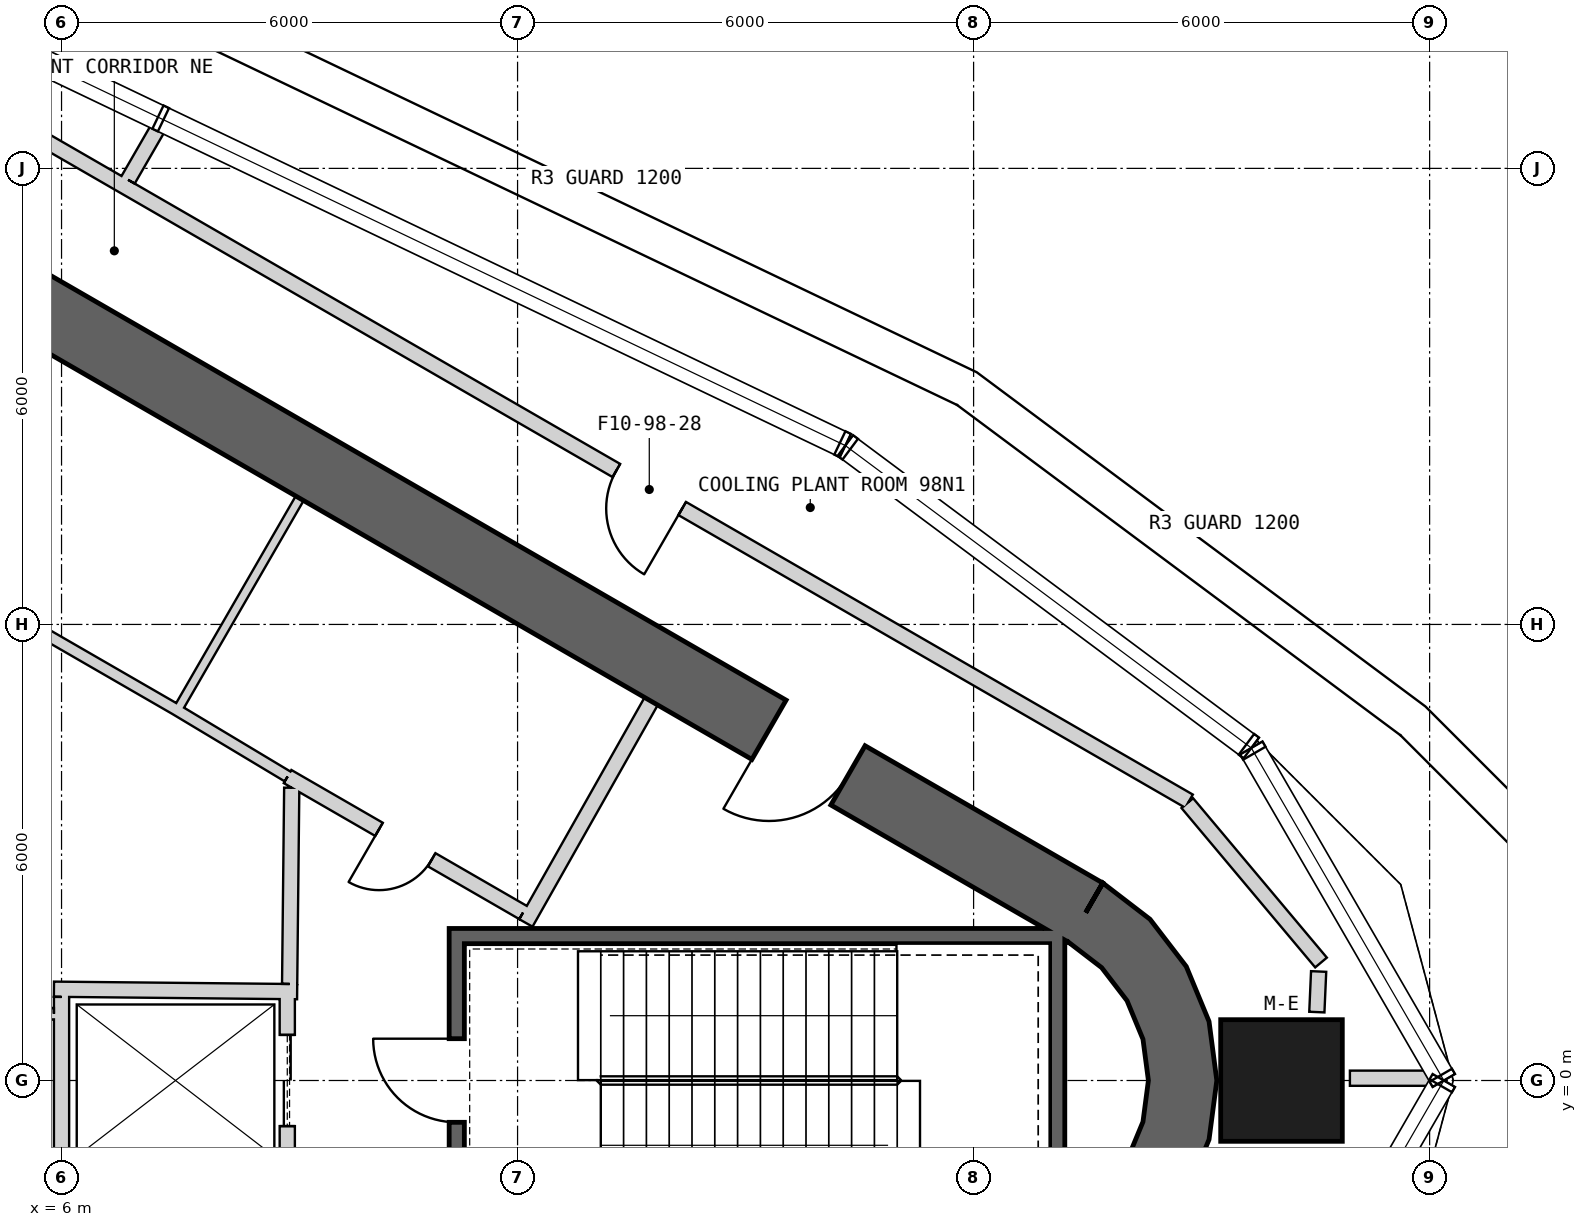
"""IFC4 building model, lengths in metres.
Left out: names, types, materials, properties, quantities, classifications, styles, units other than length and angle.
Written with IfcOpenShell. Run it as: python <this file> out.ifc"""

import sys

from ifc_helpers import new_model, si_unit, direction, frame, frame_2d, origin, origin_2d, place, context, subcontext, project, spatial, polyline, rectangle, outline, extrude, element, fill, save


model = new_model("IFC4")
c1 = context("Model", 3, precision=1e-05, world=origin(), true_north=direction((0.0, 1.0)))
c2 = subcontext(c1, "Body", "Model", "MODEL_VIEW")
j1 = project(units=[si_unit("LENGTHUNIT", "METRE"), si_unit("PLANEANGLEUNIT", "RADIAN")], contexts=[c1])
p1 = place(None, origin())
s1 = spatial("IfcSite", under=j1, at=p1, CompositionType="ELEMENT")
p2 = place(p1, origin())
s2 = spatial("IfcBuilding", under=s1, at=p2, CompositionType="ELEMENT")
p3 = place(p2, frame((0.0, 0.0, 435.3)))
s3 = spatial("IfcBuildingStorey", under=s2, at=p3, CompositionType="ELEMENT", Elevation=435.3)
p4 = place(p3, frame((22.051, 0.0, 0.0), z_axis=(0.0, 0.0, 1.0), x_axis=(1.0, 0.0, 0.0)))
e1 = element("IfcColumn", 1, at=p4, inside=s3, PredefinedType="COLUMN", context=c2, shape_type="SweptSolid", body=[
    extrude(rectangle(XDim=1.6, YDim=1.6, at=origin_2d()), origin(), (0.0, 0.0, 1.0), 5.0),
])
p5 = place(p3, frame((19.475, 2.208, 0.0), z_axis=(0.0, 0.0, 1.0), x_axis=(-0.866028369851, 0.499994862586, 0.0)))
e2 = element("IfcWall", 2, at=p5, inside=s3, PredefinedType="SHEAR", context=c2, shape_type="SweptSolid", body=[
    extrude(rectangle(XDim=31.523, YDim=0.9, at=frame_2d((15.762, 0.0))), origin(), (0.0, 0.0, 1.0), 5.0),
])
p6 = place(p5, frame((3.612, 0.0, 0.0)))
e3 = element("IfcOpeningElement", 3, at=p6, cuts=e2, PredefinedType="OPENING", context=c2, shape_type="SweptSolid", body=[
    extrude(rectangle(XDim=1.2, YDim=2.4, at=frame_2d((0.6, 1.2))), frame((0.0, 0.46, 0.0), z_axis=(0.0, -1.0, 0.0), x_axis=(1.0, 0.0, 0.0)), (0.0, 0.0, 1.0), 0.92),
])
p7 = place(p5, frame((26.712, 0.0, 0.0)))
e4 = element("IfcOpeningElement", 4, at=p7, cuts=e2, PredefinedType="OPENING", context=c2, shape_type="SweptSolid", body=[
    extrude(rectangle(XDim=1.2, YDim=2.4, at=frame_2d((0.6, 1.2))), frame((0.0, 0.46, 0.0), z_axis=(0.0, -1.0, 0.0), x_axis=(1.0, 0.0, 0.0)), (0.0, 0.0, 1.0), 0.92),
])
p8 = place(p3, origin())
e5 = element("IfcWall", 5, at=p8, inside=s3, PredefinedType="SHEAR", context=c2, shape_type="SweptSolid", body=[
    extrude(outline(polyline([(19.7, -2.598), (20.321, -2.121), (20.798, -1.5), (21.098, -0.777), (21.2, 0.0), (21.098, 0.777), (20.798, 1.5), (20.321, 2.121), (19.7, 2.598), (19.25, 1.819), (19.685, 1.485), (20.019, 1.05), (20.229, 0.543), (20.3, 0.0), (20.229, -0.543), (20.019, -1.05), (19.685, -1.485), (19.25, -1.819), (19.7, -2.598)])), origin(), (0.0, 0.0, 1.0), 5.0),
])
p9 = place(p3, frame((19.2, 1.9, -0.25), z_axis=(0.0, 0.0, 1.0), x_axis=(-1.0, 0.0, 0.0)))
e6 = element("IfcWall", 6, at=p9, inside=s3, PredefinedType="SHEAR", context=c2, shape_type="SweptSolid", body=[
    extrude(rectangle(XDim=8.1, YDim=0.2, at=frame_2d((4.05, 0.0))), origin(), (0.0, 0.0, 1.0), 5.0),
])
p10 = place(p3, frame((19.1, -2.0, -0.25), z_axis=(0.0, 0.0, 1.0), x_axis=(0.0, 1.0, 0.0)))
e7 = element("IfcWall", 7, at=p10, inside=s3, PredefinedType="SHEAR", context=c2, shape_type="SweptSolid", body=[
    extrude(rectangle(XDim=3.8, YDim=0.2, at=frame_2d((1.9, 0.0))), origin(), (0.0, 0.0, 1.0), 5.0),
])
p11 = place(p3, frame((11.2, -1.8, -0.25), z_axis=(0.0, 0.0, 1.0), x_axis=(0.0, 1.0, 0.0)))
e8 = element("IfcWall", 8, at=p11, inside=s3, PredefinedType="SHEAR", context=c2, shape_type="SweptSolid", body=[
    extrude(rectangle(XDim=3.6, YDim=0.2, at=frame_2d((1.8, 0.0))), origin(), (0.0, 0.0, 1.0), 5.0),
])
p12 = place(p11, frame((1.25, 0.0, 0.25)))
e9 = element("IfcOpeningElement", 9, at=p12, cuts=e8, PredefinedType="OPENING", context=c2, shape_type="SweptSolid", body=[
    extrude(rectangle(XDim=1.1, YDim=2.1, at=frame_2d((0.55, 1.05))), frame((0.0, 0.11, 0.0), z_axis=(0.0, -1.0, 0.0), x_axis=(1.0, 0.0, 0.0)), (0.0, 0.0, 1.0), 0.22),
])
p13 = place(p3, frame((8.97, 1.2, 0.0), z_axis=(0.0, 0.0, 1.0), x_axis=(0.0, -1.0, 0.0)))
e10 = element("IfcWall", 10, at=p13, inside=s3, PredefinedType="PLUMBINGWALL", context=c2, shape_type="SweptSolid", body=[
    extrude(rectangle(XDim=2.4, YDim=0.2, at=frame_2d((1.2, 0.0))), origin(), (0.0, 0.0, 1.0), 4.75),
])
p14 = place(p13, frame((0.6, 0.0, 0.0)))
e11 = element("IfcOpeningElement", 11, at=p14, cuts=e10, PredefinedType="OPENING", context=c2, shape_type="SweptSolid", body=[
    extrude(rectangle(XDim=1.2, YDim=2.4, at=frame_2d((0.6, 1.2))), frame((0.0, 0.11, 0.0), z_axis=(0.0, -1.0, 0.0), x_axis=(1.0, 0.0, 0.0)), (0.0, 0.0, 1.0), 0.22),
])
p15 = place(p3, frame((6.0, -1.1, 0.0), z_axis=(0.0, 0.0, 1.0), x_axis=(0.0, 1.0, 0.0)))
e12 = element("IfcWall", 12, at=p15, inside=s3, PredefinedType="PLUMBINGWALL", context=c2, shape_type="SweptSolid", body=[
    extrude(rectangle(XDim=2.2, YDim=0.2, at=frame_2d((1.1, 0.0))), origin(), (0.0, 0.0, 1.0), 4.75),
])
p16 = place(p3, frame((5.9, 1.201, 0.0), z_axis=(0.0, 0.0, 1.0), x_axis=(0.999950064753, -0.009993397809, 0.0)))
e13 = element("IfcWall", 13, at=p16, inside=s3, PredefinedType="PLUMBINGWALL", context=c2, shape_type="SweptSolid", body=[
    extrude(rectangle(XDim=3.2, YDim=0.2, at=frame_2d((1.6, 0.0))), origin(), (0.0, 0.0, 1.0), 4.75),
])
p17 = place(p3, frame((9.133, 7.659, 0.0), z_axis=(0.0, 0.0, 1.0), x_axis=(-0.500017246033, -0.866015446554, 0.0)))
e14 = element("IfcWall", 14, at=p17, inside=s3, PredefinedType="PARTITIONING", context=c2, shape_type="SweptSolid", body=[
    extrude(rectangle(XDim=3.25, YDim=0.12, at=frame_2d((1.625, 0.0))), origin(), (0.0, 0.0, 1.0), 4.75),
])
p18 = place(p3, frame((12.11, 2.073, 0.0), z_axis=(0.0, 0.0, 1.0), x_axis=(0.49196600604, 0.870614408852, 0.0)))
e15 = element("IfcWall", 15, at=p18, inside=s3, PredefinedType="PARTITIONING", context=c2, shape_type="SweptSolid", body=[
    extrude(rectangle(XDim=3.35, YDim=0.2, at=frame_2d((1.675, 0.0))), origin(), (0.0, 0.0, 1.0), 4.75),
])
p19 = place(p3, frame((8.974, 3.999, 0.0), z_axis=(0.0, 0.0, 1.0), x_axis=(0.86601284211, -0.500021756827, 0.0)))
e16 = element("IfcWall", 16, at=p19, inside=s3, PredefinedType="PARTITIONING", context=c2, shape_type="SweptSolid", body=[
    extrude(rectangle(XDim=3.577, YDim=0.2, at=frame_2d((1.789, 0.0))), origin(), (0.0, 0.0, 1.0), 4.75),
])
p20 = place(p19, frame((1.389, 0.0, 0.0)))
e17 = element("IfcOpeningElement", 17, at=p20, cuts=e16, PredefinedType="OPENING", context=c2, shape_type="SweptSolid", body=[
    extrude(rectangle(XDim=0.8, YDim=2.1, at=frame_2d((0.4, 1.05))), frame((0.0, 0.11, 0.0), z_axis=(0.0, -1.0, 0.0), x_axis=(1.0, 0.0, 0.0)), (0.0, 0.0, 1.0), 0.22),
])
p21 = place(p3, frame((8.975, 4.0, 0.0), z_axis=(0.0, 0.0, 1.0), x_axis=(-0.857530436795, 0.514433231791, 0.0)))
e18 = element("IfcWall", 18, at=p21, inside=s3, PredefinedType="PLUMBINGWALL", context=c2, shape_type="SweptSolid", body=[
    extrude(rectangle(XDim=1.723, YDim=0.15, at=frame_2d((0.861, 0.0))), origin(), (0.0, 0.0, 1.0), 4.75),
])
p22 = place(p3, frame((7.497, 4.886, 0.0), z_axis=(0.0, 0.0, 1.0), x_axis=(-0.866030989016, 0.499990325971, 0.0)))
e19 = element("IfcWall", 19, at=p22, inside=s3, PredefinedType="PLUMBINGWALL", context=c2, shape_type="SweptSolid", body=[
    extrude(rectangle(XDim=8.1, YDim=0.15, at=frame_2d((4.05, 0.0))), origin(), (0.0, 0.0, 1.0), 4.75),
])
p23 = place(p22, frame((2.3, 0.0, 0.0)))
e20 = element("IfcOpeningElement", 20, at=p23, cuts=e19, PredefinedType="OPENING", context=c2, shape_type="SweptSolid", body=[
    extrude(rectangle(XDim=0.8, YDim=2.1, at=frame_2d((0.4, 1.05))), frame((0.0, 0.085, 0.0), z_axis=(0.0, -1.0, 0.0), x_axis=(1.0, 0.0, 0.0)), (0.0, 0.0, 1.0), 0.17),
])
p24 = place(p3, frame((9.001, 1.27, 0.0), z_axis=(0.0, 0.0, 1.0), x_axis=(0.010780534828, 0.999941888346, 0.0)))
e21 = element("IfcWall", 21, at=p24, inside=s3, PredefinedType="PARTITIONING", context=c2, shape_type="SweptSolid", body=[
    extrude(rectangle(XDim=2.582, YDim=0.2, at=frame_2d((1.291, 0.0))), origin(), (0.0, 0.0, 1.0), 4.75),
])
p25 = place(p3, frame((1.344, 0.849, 0.0), z_axis=(0.0, 0.0, 1.0), x_axis=(0.999978627641, 0.00653790957, 0.0)))
e22 = element("IfcWall", 22, at=p25, inside=s3, PredefinedType="PLUMBINGWALL", context=c2, shape_type="SweptSolid", body=[
    extrude(rectangle(XDim=4.556, YDim=0.15, at=frame_2d((2.278, 0.0))), origin(), (0.0, 0.0, 1.0), 4.75),
])
p26 = place(p25, frame((1.942, 0.0, 0.0)))
e23 = element("IfcOpeningElement", 23, at=p26, cuts=e22, PredefinedType="OPENING", context=c2, shape_type="SweptSolid", body=[
    extrude(rectangle(XDim=0.8, YDim=2.1, at=frame_2d((0.4, 1.05))), frame((0.0, 0.085, 0.0), z_axis=(0.0, -1.0, 0.0), x_axis=(1.0, 0.0, 0.0)), (0.0, 0.0, 1.0), 0.17),
])
p27 = place(p3, frame((20.834, 3.675, 0.0), z_axis=(0.0, 0.0, 1.0), x_axis=(-0.866028536494, 0.499994573949, 0.0)))
e24 = element("IfcWall", 24, at=p27, inside=s3, PredefinedType="PARTITIONING", context=c2, shape_type="SweptSolid", body=[
    extrude(rectangle(XDim=32.411, YDim=0.2, at=frame_2d((16.206, 0.0))), origin(), (0.0, 0.0, 1.0), 4.75),
])
p28 = place(p27, frame((7.7, 0.0, 0.0)))
e25 = element("IfcOpeningElement", 25, at=p28, cuts=e24, PredefinedType="OPENING", context=c2, shape_type="SweptSolid", body=[
    extrude(rectangle(XDim=1.0, YDim=2.1, at=frame_2d((0.5, 1.05))), frame((0.0, 0.11, 0.0), z_axis=(0.0, -1.0, 0.0), x_axis=(1.0, 0.0, 0.0)), (0.0, 0.0, 1.0), 0.22),
])
p29 = place(p27, frame((18.006, 0.0, 0.0)))
e26 = element("IfcOpeningElement", 26, at=p29, cuts=e24, PredefinedType="OPENING", context=c2, shape_type="SweptSolid", body=[
    extrude(rectangle(XDim=1.0, YDim=2.1, at=frame_2d((0.5, 1.05))), frame((0.0, 0.11, 0.0), z_axis=(0.0, -1.0, 0.0), x_axis=(1.0, 0.0, 0.0)), (0.0, 0.0, 1.0), 0.22),
])
p30 = place(p3, frame((22.571, 1.552, 0.0), z_axis=(0.0, 0.0, 1.0), x_axis=(-0.642777788023, 0.766052684366, 0.0)))
e27 = element("IfcWall", 27, at=p30, inside=s3, PredefinedType="PARTITIONING", context=c2, shape_type="SweptSolid", body=[
    extrude(rectangle(XDim=2.737, YDim=0.2, at=frame_2d((1.369, 0.0))), origin(), (0.0, 0.0, 1.0), 4.75),
])
p31 = place(p3, frame((22.516, 0.9, 0.0), z_axis=(0.0, 0.0, 1.0), x_axis=(0.044289222506, 0.99901875096, 0.0)))
e28 = element("IfcWall", 28, at=p31, inside=s3, PredefinedType="PARTITIONING", context=c2, shape_type="SweptSolid", body=[
    extrude(rectangle(XDim=0.535, YDim=0.2, at=frame_2d((0.267, 0.0))), origin(), (0.0, 0.0, 1.0), 4.75),
])
p32 = place(p3, frame((7.271, 12.534, 0.0), z_axis=(0.0, 0.0, 1.0), x_axis=(-0.500025443912, -0.866010713236, 0.0)))
e29 = element("IfcWall", 29, at=p32, inside=s3, PredefinedType="PARTITIONING", context=c2, shape_type="SweptSolid", body=[
    extrude(rectangle(XDim=0.791, YDim=0.2, at=frame_2d((0.395, 0.0))), origin(), (0.0, 0.0, 1.0), 4.75),
])
p33 = place(p3, frame((22.951, 0.03, 0.0), z_axis=(0.0, 0.0, 1.0), x_axis=(1.0, 0.0, 0.0)))
e30 = element("IfcWall", 30, at=p33, inside=s3, PredefinedType="PARTITIONING", context=c2, shape_type="SweptSolid", body=[
    extrude(rectangle(XDim=1.098, YDim=0.2, at=frame_2d((0.549, 0.0))), origin(), (0.0, 0.0, 1.0), 3.93),
])
p34 = place(p12, origin())
e31 = element("IfcDoor", 31, at=p34, inside=s3, OperationType="SINGLE_SWING_RIGHT", PredefinedType="USERDEFINED", context=c2, shape_type="SweptSolid", body=[
    extrude(rectangle(XDim=1.1, YDim=2.1, at=frame_2d((0.55, 1.05))), frame((0.0, 0.025, 0.0), z_axis=(0.0, -1.0, 0.0), x_axis=(1.0, 0.0, 0.0)), (0.0, 0.0, 1.0), 0.05),
])
fill(e9, e31)
p35 = place(p14, origin())
e32 = element("IfcDoor", 32, at=p35, inside=s3, OperationType="SLIDING_TO_LEFT", PredefinedType="USERDEFINED", context=c2, shape_type="SweptSolid", body=[
    extrude(rectangle(XDim=1.2, YDim=2.4, at=frame_2d((0.6, 1.2))), frame((0.0, 0.025, 0.0), z_axis=(0.0, -1.0, 0.0), x_axis=(1.0, 0.0, 0.0)), (0.0, 0.0, 1.0), 0.05),
])
fill(e11, e32)
p36 = place(p20, origin())
e33 = element("IfcDoor", 33, at=p36, inside=s3, OperationType="SINGLE_SWING_LEFT", PredefinedType="USERDEFINED", context=c2, shape_type="SweptSolid", body=[
    extrude(rectangle(XDim=0.8, YDim=2.1, at=frame_2d((0.4, 1.05))), frame((0.0, 0.025, 0.0), z_axis=(0.0, -1.0, 0.0), x_axis=(1.0, 0.0, 0.0)), (0.0, 0.0, 1.0), 0.05),
])
fill(e17, e33)
p37 = place(p28, origin())
e34 = element("IfcDoor", 34, at=p37, inside=s3, OperationType="SINGLE_SWING_LEFT", PredefinedType="USERDEFINED", context=c2, shape_type="SweptSolid", body=[
    extrude(rectangle(XDim=1.0, YDim=2.1, at=frame_2d((0.5, 1.05))), frame((0.0, 0.025, 0.0), z_axis=(0.0, -1.0, 0.0), x_axis=(1.0, 0.0, 0.0)), (0.0, 0.0, 1.0), 0.05),
])
fill(e25, e34)
p38 = place(p6, origin())
e35 = element("IfcDoor", 35, at=p38, inside=s3, OperationType="SINGLE_SWING_RIGHT", PredefinedType="USERDEFINED", context=c2, shape_type="SweptSolid", body=[
    extrude(rectangle(XDim=1.2, YDim=2.4, at=frame_2d((0.6, 1.2))), frame((0.0, 0.025, 0.0), z_axis=(0.0, -1.0, 0.0), x_axis=(1.0, 0.0, 0.0)), (0.0, 0.0, 1.0), 0.05),
])
fill(e3, e35)
save(model, sys.argv[1])
